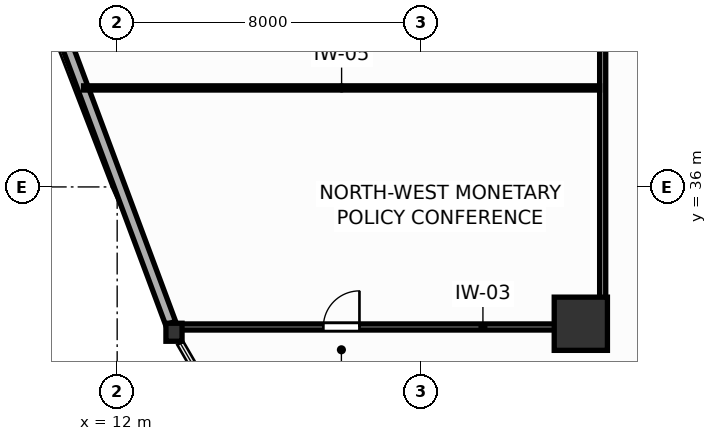
"""IFC4 building model, lengths in metres.
Left out: names, types, materials, properties, quantities, classifications, styles, units other than length and angle.
Written with IfcOpenShell. Run it as: python <this file> out.ifc"""

import sys

from ifc_helpers import new_model, si_unit, direction, frame, frame_2d, origin, origin_2d, place, context, subcontext, project, spatial, rectangle, i_section, extrude, source, transform, mapped, element, fill, save


model = new_model("IFC4")
c1 = context("Model", 3, precision=1e-05, world=origin(), true_north=direction((0.0, 1.0)))
c2 = subcontext(c1, "Body", "Model", "MODEL_VIEW")
j1 = project(units=[si_unit("LENGTHUNIT", "METRE"), si_unit("PLANEANGLEUNIT", "RADIAN")], contexts=[c1])
p1 = place(None, origin())
s1 = spatial("IfcSite", under=j1, at=p1, CompositionType="ELEMENT")
p2 = place(p1, origin())
s2 = spatial("IfcBuilding", under=s1, at=p2, CompositionType="ELEMENT")
p3 = place(p2, frame((0.0, 0.0, 43.5)))
s3 = spatial("IfcBuildingStorey", under=s2, at=p3, CompositionType="ELEMENT", Elevation=43.5)
m1 = source(origin(), c2, "Body", "SweptSolid", [
    extrude(rectangle(XDim=1.4, YDim=1.4, at=origin_2d()), origin(), (0.0, 0.0, 1.0), 3.9),
])
p4 = place(p3, frame((24.2, 32.4, 0.0), z_axis=(0.0, 0.0, 1.0), x_axis=(1.0, 0.0, 0.0)))
e1 = element("IfcColumn", 1, at=p4, inside=s3, PredefinedType="COLUMN", context=c2, shape_type="MappedRepresentation", body=[
    mapped(m1, transform((0.0, 0.0, 0.0), scale=1.0)),
])
m2 = source(origin(), c2, "Body", "SweptSolid", [
    extrude(i_section(OverallWidth=0.424, OverallDepth=0.474, WebThickness=0.045, FlangeThickness=0.072, FilletRadius=0.015, at=origin_2d()), origin(), (0.0, 0.0, 1.0), 3.9),
])
p5 = place(p3, frame((13.495, 32.177, 0.0), z_axis=(0.0, 0.0, 1.0), x_axis=(1.0, 0.0, 0.0)))
e2 = element("IfcColumn", 2, at=p5, inside=s3, PredefinedType="COLUMN", context=c2, shape_type="MappedRepresentation", body=[
    mapped(m2, transform((0.0, 0.0, 0.0), scale=1.0)),
])
p6 = place(p3, frame((6.96, 49.698, 0.0), z_axis=(0.0, 0.0, 1.0), x_axis=(0.349439969545, -0.936958754527, 0.0)))
e3 = element("IfcWall", 3, at=p6, inside=s3, PredefinedType="SOLIDWALL", context=c2, shape_type="SweptSolid", body=[
    extrude(rectangle(XDim=18.442, YDim=0.28, at=frame_2d((9.221, 0.0))), origin(), (0.0, 0.0, 1.0), 2.08),
])
p7 = place(p3, frame((24.775, 32.31, 0.0), z_axis=(0.0, 0.0, 1.0), x_axis=(0.0, 1.0, 0.0)))
e4 = element("IfcWall", 4, at=p7, inside=s3, PredefinedType="PARTITIONING", context=c2, shape_type="SweptSolid", body=[
    extrude(rectangle(XDim=24.519, YDim=0.16, at=frame_2d((12.26, 0.0))), origin(), (0.0, 0.0, 1.0), 3.68),
])
p8 = place(p7, frame((11.654, 0.0, 0.0)))
e5 = element("IfcOpeningElement", 5, at=p8, cuts=e4, PredefinedType="OPENING", context=c2, shape_type="SweptSolid", body=[
    extrude(rectangle(XDim=0.95, YDim=2.05, at=frame_2d((0.475, 1.025))), frame((0.0, 0.09, 0.0), z_axis=(0.0, -1.0, 0.0), x_axis=(1.0, 0.0, 0.0)), (0.0, 0.0, 1.0), 0.18),
])
p9 = place(p3, frame((13.463, 32.315, 0.0), z_axis=(0.0, 0.0, 1.0), x_axis=(1.0, 0.0, 0.0)))
e6 = element("IfcWall", 6, at=p9, inside=s3, PredefinedType="PARTITIONING", context=c2, shape_type="SweptSolid", body=[
    extrude(rectangle(XDim=11.23, YDim=0.16, at=frame_2d((5.615, 0.0))), origin(), (0.0, 0.0, 1.0), 2.24),
])
p10 = place(p9, frame((3.962, 0.0, 0.0)))
e7 = element("IfcOpeningElement", 7, at=p10, cuts=e6, PredefinedType="OPENING", context=c2, shape_type="SweptSolid", body=[
    extrude(rectangle(XDim=0.95, YDim=2.05, at=frame_2d((0.475, 1.025))), frame((0.0, 0.09, 0.0), z_axis=(0.0, -1.0, 0.0), x_axis=(1.0, 0.0, 0.0)), (0.0, 0.0, 1.0), 0.18),
])
p11 = place(p3, frame((11.118, 38.605, 0.0), z_axis=(0.0, 0.0, 1.0), x_axis=(1.0, 0.0, 0.0)))
e8 = element("IfcWall", 8, at=p11, inside=s3, PredefinedType="MOVABLE", context=c2, shape_type="SweptSolid", body=[
    extrude(rectangle(XDim=13.575, YDim=0.11, at=frame_2d((6.788, 0.0))), origin(), (0.0, 0.0, 1.0), 3.68),
])
p12 = place(p10, origin())
e9 = element("IfcDoor", 9, at=p12, inside=s3, OperationType="SINGLE_SWING_RIGHT", PredefinedType="DOOR", context=c2, shape_type="SweptSolid", body=[
    extrude(rectangle(XDim=0.95, YDim=2.05, at=frame_2d((0.475, 1.025))), frame((0.0, 0.025, 0.0), z_axis=(0.0, -1.0, 0.0), x_axis=(1.0, 0.0, 0.0)), (0.0, 0.0, 1.0), 0.05),
])
fill(e7, e9)
save(model, sys.argv[1])
